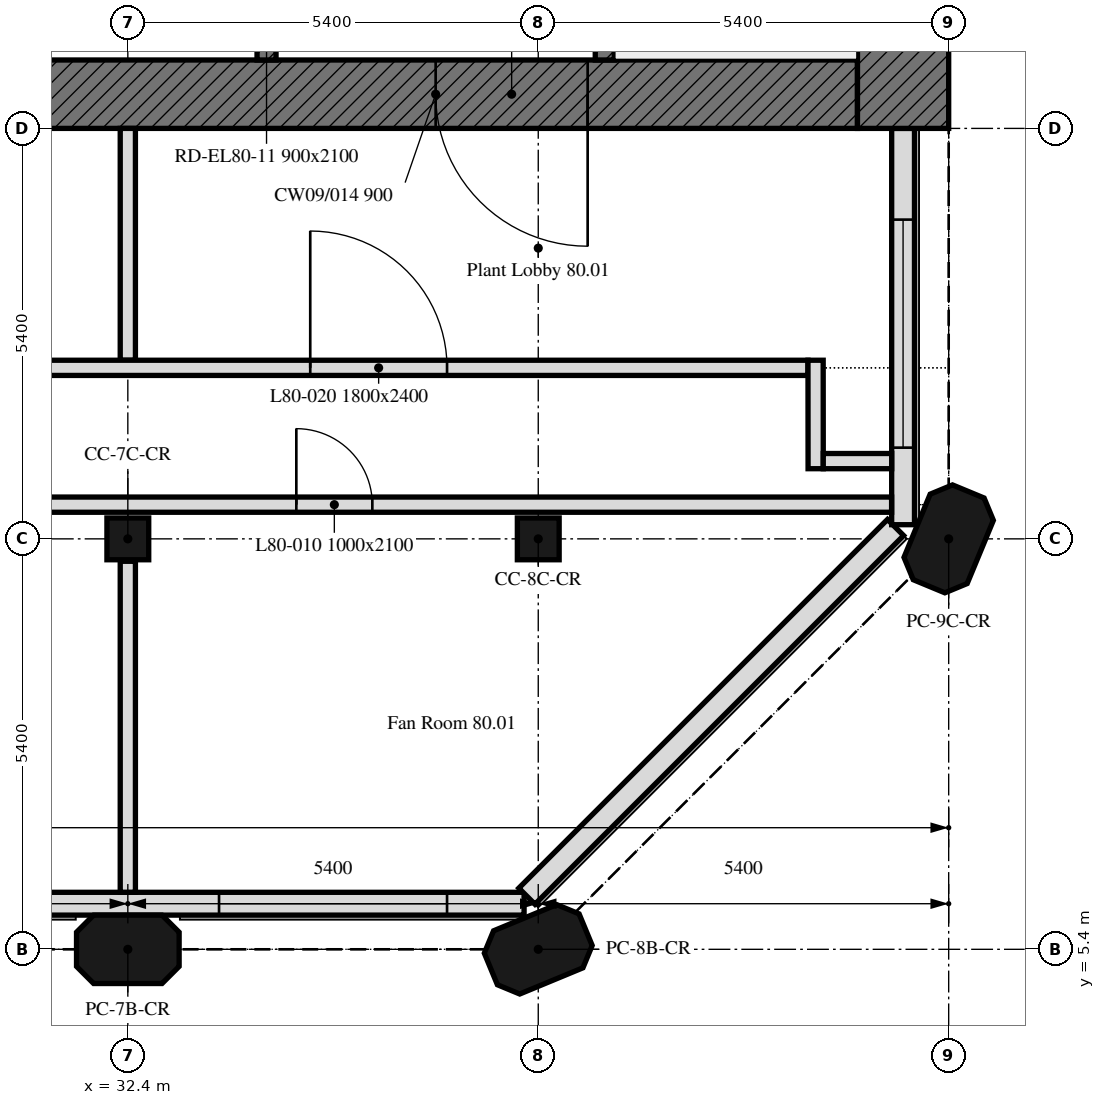
"""IFC4 building model, lengths in metres.
Left out: names, types, materials, properties, quantities, classifications, styles, units other than length and angle.
Written with IfcOpenShell. Run it as: python <this file> out.ifc"""

import sys

from ifc_helpers import new_model, si_unit, direction, frame, frame_2d, origin, origin_2d, place, context, subcontext, project, spatial, polyline, rectangle, outline, extrude, element, fill, save


model = new_model("IFC4")
c1 = context("Model", 3, precision=1e-05, world=origin(), true_north=direction((0.0, 1.0)))
c2 = subcontext(c1, "Body", "Model", "MODEL_VIEW")
j1 = project(units=[si_unit("LENGTHUNIT", "METRE"), si_unit("PLANEANGLEUNIT", "RADIAN")], contexts=[c1])
p1 = place(None, origin())
s1 = spatial("IfcSite", under=j1, at=p1, CompositionType="ELEMENT")
p2 = place(p1, origin())
s2 = spatial("IfcBuilding", under=s1, at=p2, CompositionType="ELEMENT")
p3 = place(p2, frame((0.0, 0.0, 321.7)))
s3 = spatial("IfcBuildingStorey", under=s2, at=p3, CompositionType="ELEMENT", Elevation=321.7)
for number, where, z_axis, x_axis in (
    (1, (32.4, 5.4, 0.0), (0.0, 0.0, 1.0), (1.0, 0.0, 0.0)),
    (2, (37.8, 5.4, 0.0), (0.0, 0.0, 1.0), (0.924, 0.383, 0.0)),
):
    element("IfcColumn", number, at=place(p3, frame(where, z_axis=z_axis, x_axis=x_axis)), inside=s3, PredefinedType="COLUMN", context=c2, shape_type="SweptSolid", body=[
        extrude(outline(polyline([(-0.45, -0.45), (0.45, -0.45), (0.675, -0.225), (0.675, 0.225), (0.45, 0.45), (-0.45, 0.45), (-0.675, 0.225), (-0.675, -0.225), (-0.45, -0.45)])), origin(), (0.0, 0.0, 1.0), 4.2),
    ])
for number, where, z_axis, x_axis in (
    (3, (32.4, 10.8, 0.0), (0.0, 0.0, 1.0), (1.0, 0.0, 0.0)),
    (4, (37.8, 10.8, 0.0), (0.0, 0.0, 1.0), (1.0, 0.0, 0.0)),
):
    element("IfcColumn", number, at=place(p3, frame(where, z_axis=z_axis, x_axis=x_axis)), inside=s3, PredefinedType="COLUMN", context=c2, shape_type="SweptSolid", body=[
        extrude(rectangle(XDim=0.55, YDim=0.55, at=origin_2d()), origin(), (0.0, 0.0, 1.0), 4.2),
    ])
p4 = place(p3, frame((43.2, 10.8, 0.0), z_axis=(0.0, 0.0, 1.0), x_axis=(0.382683432365, 0.923879532511, 0.0)))
e5 = element("IfcColumn", 5, at=p4, inside=s3, PredefinedType="COLUMN", context=c2, shape_type="SweptSolid", body=[
    extrude(outline(polyline([(-0.45, -0.45), (0.45, -0.45), (0.675, -0.225), (0.675, 0.225), (0.45, 0.45), (-0.45, 0.45), (-0.675, 0.225), (-0.675, -0.225), (-0.45, -0.45)])), origin(), (0.0, 0.0, 1.0), 4.2),
])
p5 = place(p3, frame((9.45, 6.0, 0.0), z_axis=(0.0, 0.0, 1.0), x_axis=(1.0, 0.0, 0.0)))
e6 = element("IfcWall", 6, at=p5, inside=s3, PredefinedType="SOLIDWALL", context=c2, shape_type="SweptSolid", body=[
    extrude(outline(polyline([(0.0, 0.0), (28.164, 0.0), (28.164, 4.2), (27.564, 4.2), (26.965, 4.2), (26.366, 4.2), (25.767, 4.2), (25.167, 4.2), (24.568, 4.2), (23.969, 4.2), (23.37, 4.2), (22.771, 4.2), (22.171, 4.2), (21.572, 4.2), (20.973, 4.2), (20.374, 4.2), (19.774, 4.2), (19.175, 4.2), (18.576, 4.2), (17.977, 4.2), (17.377, 4.2), (16.778, 4.2), (16.179, 4.2), (15.58, 4.2), (14.981, 4.2), (14.381, 4.2), (13.782, 4.2), (13.183, 4.2), (12.584, 4.2), (11.985, 4.2), (11.385, 4.2), (10.786, 4.2), (10.187, 4.2), (9.588, 4.2), (8.988, 4.2), (8.389, 4.2), (7.79, 4.2), (7.191, 4.2), (6.592, 4.2), (5.992, 4.2), (5.393, 4.2), (4.794, 4.2), (4.195, 4.2), (3.595, 4.2), (2.996, 4.2), (2.397, 4.2), (1.798, 4.2), (1.198, 4.2), (0.599, 4.2), (0.0, 4.2), (0.0, 0.0)])), frame((0.0, 0.15, 0.0), z_axis=(0.0, -1.0, 0.0), x_axis=(1.0, 0.0, 0.0)), (0.0, 0.0, 1.0), 0.3),
])
p6 = place(p5, frame((2.55, 0.0, 0.6)))
e7 = element("IfcOpeningElement", 7, at=p6, cuts=e6, PredefinedType="OPENING", context=c2, shape_type="SweptSolid", body=[
    extrude(rectangle(XDim=3.0, YDim=1.8, at=frame_2d((1.5, 0.9))), frame((0.0, 0.16, 0.0), z_axis=(0.0, -1.0, 0.0), x_axis=(1.0, 0.0, 0.0)), (0.0, 0.0, 1.0), 0.32),
])
p7 = place(p5, frame((7.95, 0.0, 0.6)))
e8 = element("IfcOpeningElement", 8, at=p7, cuts=e6, PredefinedType="OPENING", context=c2, shape_type="SweptSolid", body=[
    extrude(rectangle(XDim=3.0, YDim=1.8, at=frame_2d((1.5, 0.9))), frame((0.0, 0.16, 0.0), z_axis=(0.0, -1.0, 0.0), x_axis=(1.0, 0.0, 0.0)), (0.0, 0.0, 1.0), 0.32),
])
p8 = place(p5, frame((13.35, 0.0, 0.6)))
e9 = element("IfcOpeningElement", 9, at=p8, cuts=e6, PredefinedType="OPENING", context=c2, shape_type="SweptSolid", body=[
    extrude(rectangle(XDim=3.0, YDim=1.8, at=frame_2d((1.5, 0.9))), frame((0.0, 0.16, 0.0), z_axis=(0.0, -1.0, 0.0), x_axis=(1.0, 0.0, 0.0)), (0.0, 0.0, 1.0), 0.32),
])
p9 = place(p5, frame((18.75, 0.0, 0.6)))
e10 = element("IfcOpeningElement", 10, at=p9, cuts=e6, PredefinedType="OPENING", context=c2, shape_type="SweptSolid", body=[
    extrude(rectangle(XDim=3.0, YDim=1.8, at=frame_2d((1.5, 0.9))), frame((0.0, 0.16, 0.0), z_axis=(0.0, -1.0, 0.0), x_axis=(1.0, 0.0, 0.0)), (0.0, 0.0, 1.0), 0.32),
])
p10 = place(p5, frame((24.15, 0.0, 0.6)))
e11 = element("IfcOpeningElement", 11, at=p10, cuts=e6, PredefinedType="OPENING", context=c2, shape_type="SweptSolid", body=[
    extrude(rectangle(XDim=3.0, YDim=1.8, at=frame_2d((1.5, 0.9))), frame((0.0, 0.16, 0.0), z_axis=(0.0, -1.0, 0.0), x_axis=(1.0, 0.0, 0.0)), (0.0, 0.0, 1.0), 0.32),
])
p11 = place(p3, frame((37.65, 6.099, 0.0), z_axis=(0.0, 0.0, 1.0), x_axis=(0.707106781187, 0.707106781187, 0.0)))
e12 = element("IfcWall", 12, at=p11, inside=s3, PredefinedType="SOLIDWALL", context=c2, shape_type="SweptSolid", body=[
    extrude(outline(polyline([(0.0, 0.0), (6.86, 0.0), (6.86, 4.2), (6.288, 4.2), (5.716, 4.2), (5.145, 4.2), (4.573, 4.2), (4.001, 4.2), (3.43, 4.2), (2.858, 4.2), (2.287, 4.2), (1.715, 4.2), (1.143, 4.2), (0.572, 4.2), (0.0, 4.2), (0.0, 0.0)])), frame((0.0, 0.15, 0.0), z_axis=(0.0, -1.0, 0.0), x_axis=(1.0, 0.0, 0.0)), (0.0, 0.0, 1.0), 0.3),
])
p12 = place(p3, frame((42.6, 10.986, 0.0), z_axis=(0.0, 0.0, 1.0), x_axis=(0.0, 1.0, 0.0)))
e13 = element("IfcWall", 13, at=p12, inside=s3, PredefinedType="SOLIDWALL", context=c2, shape_type="SweptSolid", body=[
    extrude(outline(polyline([(0.0, 0.0), (5.214, 0.0), (5.214, 4.2), (4.634, 4.2), (4.055, 4.2), (3.476, 4.2), (2.896, 4.2), (2.317, 4.2), (1.738, 4.2), (1.159, 4.2), (0.579, 4.2), (0.0, 4.2), (0.0, 0.0)])), frame((0.0, 0.15, 0.0), z_axis=(0.0, -1.0, 0.0), x_axis=(1.0, 0.0, 0.0)), (0.0, 0.0, 1.0), 0.3),
])
p13 = place(p12, frame((1.014, 0.0, 0.6)))
e14 = element("IfcOpeningElement", 14, at=p13, cuts=e13, PredefinedType="OPENING", context=c2, shape_type="SweptSolid", body=[
    extrude(rectangle(XDim=3.0, YDim=1.8, at=frame_2d((1.5, 0.9))), frame((0.0, 0.16, 0.0), z_axis=(0.0, -1.0, 0.0), x_axis=(1.0, 0.0, 0.0)), (0.0, 0.0, 1.0), 0.32),
])
p14 = place(p3, frame((42.0, 16.65, 0.0), z_axis=(0.0, 0.0, 1.0), x_axis=(-1.0, 0.0, 0.0)))
e15 = element("IfcWall", 15, at=p14, inside=s3, PredefinedType="SOLIDWALL", context=c2, shape_type="SweptSolid", body=[
    extrude(rectangle(XDim=11.1, YDim=0.9, at=frame_2d((5.55, 0.0))), origin(), (0.0, 0.0, 1.0), 4.2),
])
p15 = place(p14, frame((3.55, 0.0, 0.0)))
e16 = element("IfcOpeningElement", 16, at=p15, cuts=e15, PredefinedType="OPENING", context=c2, shape_type="SweptSolid", body=[
    extrude(rectangle(XDim=2.0, YDim=2.4, at=frame_2d((1.0, 1.2))), frame((0.0, 0.45, 0.0), z_axis=(0.0, -1.0, 0.0), x_axis=(1.0, 0.0, 0.0)), (0.0, 0.0, 1.0), 0.9),
])
p16 = place(p3, frame((42.6, 32.4, 0.0), z_axis=(0.0, 0.0, 1.0), x_axis=(0.0, -1.0, 0.0)))
e17 = element("IfcWall", 17, at=p16, inside=s3, PredefinedType="SOLIDWALL", context=c2, shape_type="SweptSolid", body=[
    extrude(rectangle(XDim=16.2, YDim=1.2, at=frame_2d((8.1, 0.0))), origin(), (0.0, 0.0, 1.0), 4.2),
])
p17 = place(p3, frame((38.675, 17.1, 0.0), z_axis=(0.0, 0.0, 1.0), x_axis=(0.0, 1.0, 0.0)))
e18 = element("IfcWall", 18, at=p17, inside=s3, PredefinedType="SOLIDWALL", context=c2, shape_type="SweptSolid", body=[
    extrude(rectangle(XDim=14.4, YDim=0.25, at=frame_2d((7.2, 0.0))), origin(), (0.0, 0.0, 1.0), 4.2),
])
p18 = place(p17, frame((4.6, 0.0, 0.0)))
e19 = element("IfcOpeningElement", 19, at=p18, cuts=e18, PredefinedType="OPENING", context=c2, shape_type="SweptSolid", body=[
    extrude(rectangle(XDim=1.0, YDim=2.1, at=frame_2d((0.5, 1.05))), frame((0.0, 0.125, 0.0), z_axis=(0.0, -1.0, 0.0), x_axis=(1.0, 0.0, 0.0)), (0.0, 0.0, 1.0), 0.25),
])
p19 = place(p17, frame((7.062, 0.0, 0.0)))
e20 = element("IfcOpeningElement", 20, at=p19, cuts=e18, PredefinedType="OPENING", context=c2, shape_type="SweptSolid", body=[
    extrude(rectangle(XDim=1.2, YDim=2.1, at=frame_2d((0.6, 1.05))), frame((0.0, 0.125, 0.0), z_axis=(0.0, -1.0, 0.0), x_axis=(1.0, 0.0, 0.0)), (0.0, 0.0, 1.0), 0.25),
])
p20 = place(p17, frame((10.41, 0.0, 0.0)))
e21 = element("IfcOpeningElement", 21, at=p20, cuts=e18, PredefinedType="OPENING", context=c2, shape_type="SweptSolid", body=[
    extrude(rectangle(XDim=0.9, YDim=2.1, at=frame_2d((0.45, 1.05))), frame((0.0, 0.125, 0.0), z_axis=(0.0, -1.0, 0.0), x_axis=(1.0, 0.0, 0.0)), (0.0, 0.0, 1.0), 0.25),
])
p21 = place(p17, frame((13.023, 0.0, 0.0)))
e22 = element("IfcOpeningElement", 22, at=p21, cuts=e18, PredefinedType="OPENING", context=c2, shape_type="SweptSolid", body=[
    extrude(rectangle(XDim=0.9, YDim=2.1, at=frame_2d((0.45, 1.05))), frame((0.0, 0.125, 0.0), z_axis=(0.0, -1.0, 0.0), x_axis=(1.0, 0.0, 0.0)), (0.0, 0.0, 1.0), 0.25),
])
p22 = place(p3, frame((34.225, 17.1, 0.0), z_axis=(0.0, 0.0, 1.0), x_axis=(0.0, 1.0, 0.0)))
e23 = element("IfcWall", 23, at=p22, inside=s3, PredefinedType="SOLIDWALL", context=c2, shape_type="SweptSolid", body=[
    extrude(rectangle(XDim=14.4, YDim=0.25, at=frame_2d((7.2, 0.0))), origin(), (0.0, 0.0, 1.0), 4.2),
])
p23 = place(p22, frame((13.15, 0.0, 0.0)))
e24 = element("IfcOpeningElement", 24, at=p23, cuts=e23, PredefinedType="OPENING", context=c2, shape_type="SweptSolid", body=[
    extrude(rectangle(XDim=1.0, YDim=2.1, at=frame_2d((0.5, 1.05))), frame((0.0, 0.125, 0.0), z_axis=(0.0, -1.0, 0.0), x_axis=(1.0, 0.0, 0.0)), (0.0, 0.0, 1.0), 0.25),
])
p24 = place(p22, frame((0.968, 0.0, 0.0)))
e25 = element("IfcOpeningElement", 25, at=p24, cuts=e23, PredefinedType="OPENING", context=c2, shape_type="SweptSolid", body=[
    extrude(rectangle(XDim=0.9, YDim=2.1, at=frame_2d((0.45, 1.05))), frame((0.0, 0.125, 0.0), z_axis=(0.0, -1.0, 0.0), x_axis=(1.0, 0.0, 0.0)), (0.0, 0.0, 1.0), 0.25),
])
p25 = place(p22, frame((3.468, 0.0, 0.0)))
e26 = element("IfcOpeningElement", 26, at=p25, cuts=e23, PredefinedType="OPENING", context=c2, shape_type="SweptSolid", body=[
    extrude(rectangle(XDim=0.9, YDim=2.1, at=frame_2d((0.45, 1.05))), frame((0.0, 0.125, 0.0), z_axis=(0.0, -1.0, 0.0), x_axis=(1.0, 0.0, 0.0)), (0.0, 0.0, 1.0), 0.25),
])
p26 = place(p22, frame((6.175, 0.0, 0.0)))
e27 = element("IfcOpeningElement", 27, at=p26, cuts=e23, PredefinedType="OPENING", context=c2, shape_type="SweptSolid", body=[
    extrude(rectangle(XDim=0.9, YDim=2.1, at=frame_2d((0.45, 1.05))), frame((0.0, 0.125, 0.0), z_axis=(0.0, -1.0, 0.0), x_axis=(1.0, 0.0, 0.0)), (0.0, 0.0, 1.0), 0.25),
])
p27 = place(p3, frame((32.4, 10.505, 0.0), z_axis=(0.0, 0.0, 1.0), x_axis=(0.0, -1.0, 0.0)))
e28 = element("IfcWall", 28, at=p27, inside=s3, PredefinedType="PARTITIONING", context=c2, shape_type="SweptSolid", body=[
    extrude(rectangle(XDim=4.354, YDim=0.2, at=frame_2d((2.177, 0.0))), origin(), (0.0, 0.0, 1.0), 4.2),
])
p28 = place(p3, frame((9.45, 11.25, 0.0), z_axis=(0.0, 0.0, 1.0), x_axis=(1.0, 0.0, 0.0)))
e29 = element("IfcWall", 29, at=p28, inside=s3, PredefinedType="PARTITIONING", context=c2, shape_type="SweptSolid", body=[
    extrude(rectangle(XDim=32.999, YDim=0.2, at=frame_2d((16.5, 0.0))), origin(), (0.0, 0.0, 1.0), 4.2),
])
p29 = place(p28, frame((25.167, 0.0, 0.0)))
e30 = element("IfcOpeningElement", 30, at=p29, cuts=e29, PredefinedType="OPENING", context=c2, shape_type="SweptSolid", body=[
    extrude(rectangle(XDim=1.0, YDim=2.1, at=frame_2d((0.5, 1.05))), frame((0.0, 0.1, 0.0), z_axis=(0.0, -1.0, 0.0), x_axis=(1.0, 0.0, 0.0)), (0.0, 0.0, 1.0), 0.2),
])
p30 = place(p28, frame((19.733, 0.0, 0.0)))
e31 = element("IfcOpeningElement", 31, at=p30, cuts=e29, PredefinedType="OPENING", context=c2, shape_type="SweptSolid", body=[
    extrude(rectangle(XDim=1.0, YDim=2.1, at=frame_2d((0.5, 1.05))), frame((0.0, 0.1, 0.0), z_axis=(0.0, -1.0, 0.0), x_axis=(1.0, 0.0, 0.0)), (0.0, 0.0, 1.0), 0.2),
])
p31 = place(p28, frame((3.567, 0.0, 0.0)))
e32 = element("IfcOpeningElement", 32, at=p31, cuts=e29, PredefinedType="OPENING", context=c2, shape_type="SweptSolid", body=[
    extrude(rectangle(XDim=1.0, YDim=2.1, at=frame_2d((0.5, 1.05))), frame((0.0, 0.1, 0.0), z_axis=(0.0, -1.0, 0.0), x_axis=(1.0, 0.0, 0.0)), (0.0, 0.0, 1.0), 0.2),
])
p32 = place(p3, frame((32.4, 13.15, 0.0), z_axis=(0.0, 0.0, 1.0), x_axis=(0.0, 1.0, 0.0)))
e33 = element("IfcWall", 33, at=p32, inside=s3, PredefinedType="PARTITIONING", context=c2, shape_type="SweptSolid", body=[
    extrude(rectangle(XDim=3.05, YDim=0.2, at=frame_2d((1.525, 0.0))), origin(), (0.0, 0.0, 1.0), 4.2),
])
p33 = place(p3, frame((9.45, 13.05, 0.0), z_axis=(0.0, 0.0, 1.0), x_axis=(1.0, 0.0, 0.0)))
e34 = element("IfcWall", 34, at=p33, inside=s3, PredefinedType="PARTITIONING", context=c2, shape_type="SweptSolid", body=[
    extrude(rectangle(XDim=31.899, YDim=0.2, at=frame_2d((15.95, 0.0))), origin(), (0.0, 0.0, 1.0), 4.2),
])
p34 = place(p33, frame((19.75, 0.0, 0.0)))
e35 = element("IfcOpeningElement", 35, at=p34, cuts=e34, PredefinedType="OPENING", context=c2, shape_type="SweptSolid", body=[
    extrude(rectangle(XDim=1.0, YDim=2.1, at=frame_2d((0.5, 1.05))), frame((0.0, 0.1, 0.0), z_axis=(0.0, -1.0, 0.0), x_axis=(1.0, 0.0, 0.0)), (0.0, 0.0, 1.0), 0.2),
])
p35 = place(p33, frame((14.35, 0.0, 0.0)))
e36 = element("IfcOpeningElement", 36, at=p35, cuts=e34, PredefinedType="OPENING", context=c2, shape_type="SweptSolid", body=[
    extrude(rectangle(XDim=1.0, YDim=2.1, at=frame_2d((0.5, 1.05))), frame((0.0, 0.1, 0.0), z_axis=(0.0, -1.0, 0.0), x_axis=(1.0, 0.0, 0.0)), (0.0, 0.0, 1.0), 0.2),
])
p36 = place(p33, frame((9.05, 0.0, 0.0)))
e37 = element("IfcOpeningElement", 37, at=p36, cuts=e34, PredefinedType="OPENING", context=c2, shape_type="SweptSolid", body=[
    extrude(rectangle(XDim=0.8, YDim=2.1, at=frame_2d((0.4, 1.05))), frame((0.0, 0.1, 0.0), z_axis=(0.0, -1.0, 0.0), x_axis=(1.0, 0.0, 0.0)), (0.0, 0.0, 1.0), 0.2),
])
p37 = place(p33, frame((25.35, 0.0, 0.0)))
e38 = element("IfcOpeningElement", 38, at=p37, cuts=e34, PredefinedType="OPENING", context=c2, shape_type="SweptSolid", body=[
    extrude(rectangle(XDim=1.8, YDim=2.4, at=frame_2d((0.9, 1.2))), frame((0.0, 0.1, 0.0), z_axis=(0.0, -1.0, 0.0), x_axis=(1.0, 0.0, 0.0)), (0.0, 0.0, 1.0), 0.2),
])
p38 = place(p3, frame((41.449, 13.15, 0.0), z_axis=(0.0, 0.0, 1.0), x_axis=(0.00085543168, -0.999999634118, 0.0)))
e39 = element("IfcWall", 39, at=p38, inside=s3, PredefinedType="PARTITIONING", context=c2, shape_type="SweptSolid", body=[
    extrude(rectangle(XDim=1.427, YDim=0.2, at=frame_2d((0.713, 0.0))), origin(), (0.0, 0.0, 1.0), 4.2),
])
p39 = place(p3, frame((41.55, 11.823, 0.0), z_axis=(0.0, 0.0, 1.0), x_axis=(1.0, 0.0, 0.0)))
e40 = element("IfcWall", 40, at=p39, inside=s3, PredefinedType="PARTITIONING", context=c2, shape_type="SweptSolid", body=[
    extrude(rectangle(XDim=0.9, YDim=0.2, at=frame_2d((0.45, 0.0))), origin(), (0.0, 0.0, 1.0), 4.2),
])
p40 = place(p10, origin())
e41 = element("IfcWindow", 41, at=p40, inside=s3, PartitioningType="SINGLE_PANEL", PredefinedType="WINDOW", context=c2, shape_type="SweptSolid", body=[
    extrude(rectangle(XDim=3.0, YDim=1.8, at=frame_2d((1.5, 0.9))), frame((0.0, 0.03, 0.0), z_axis=(0.0, -1.0, 0.0), x_axis=(1.0, 0.0, 0.0)), (0.0, 0.0, 1.0), 0.06),
])
fill(e11, e41)
p41 = place(p13, origin())
e42 = element("IfcWindow", 42, at=p41, inside=s3, PartitioningType="SINGLE_PANEL", PredefinedType="WINDOW", context=c2, shape_type="SweptSolid", body=[
    extrude(rectangle(XDim=3.0, YDim=1.8, at=frame_2d((1.5, 0.9))), frame((0.0, 0.03, 0.0), z_axis=(0.0, -1.0, 0.0), x_axis=(1.0, 0.0, 0.0)), (0.0, 0.0, 1.0), 0.06),
])
fill(e14, e42)
p42 = place(p15, origin())
e43 = element("IfcDoor", 43, at=p42, inside=s3, OperationType="DOUBLE_DOOR_SINGLE_SWING", PredefinedType="DOOR", context=c2, shape_type="SweptSolid", body=[
    extrude(rectangle(XDim=2.0, YDim=2.4, at=frame_2d((1.0, 1.2))), frame((0.0, 0.025, 0.0), z_axis=(0.0, -1.0, 0.0), x_axis=(1.0, 0.0, 0.0)), (0.0, 0.0, 1.0), 0.05),
])
fill(e16, e43)
p43 = place(p29, origin())
e44 = element("IfcDoor", 44, at=p43, inside=s3, OperationType="SINGLE_SWING_RIGHT", PredefinedType="DOOR", context=c2, shape_type="SweptSolid", body=[
    extrude(rectangle(XDim=1.0, YDim=2.1, at=frame_2d((0.5, 1.05))), frame((0.0, 0.025, 0.0), z_axis=(0.0, -1.0, 0.0), x_axis=(1.0, 0.0, 0.0)), (0.0, 0.0, 1.0), 0.05),
])
fill(e30, e44)
p44 = place(p37, origin())
e45 = element("IfcDoor", 45, at=p44, inside=s3, OperationType="DOUBLE_DOOR_SINGLE_SWING", PredefinedType="DOOR", context=c2, shape_type="SweptSolid", body=[
    extrude(rectangle(XDim=1.8, YDim=2.4, at=frame_2d((0.9, 1.2))), frame((0.0, 0.025, 0.0), z_axis=(0.0, -1.0, 0.0), x_axis=(1.0, 0.0, 0.0)), (0.0, 0.0, 1.0), 0.05),
])
fill(e38, e45)
save(model, sys.argv[1])
